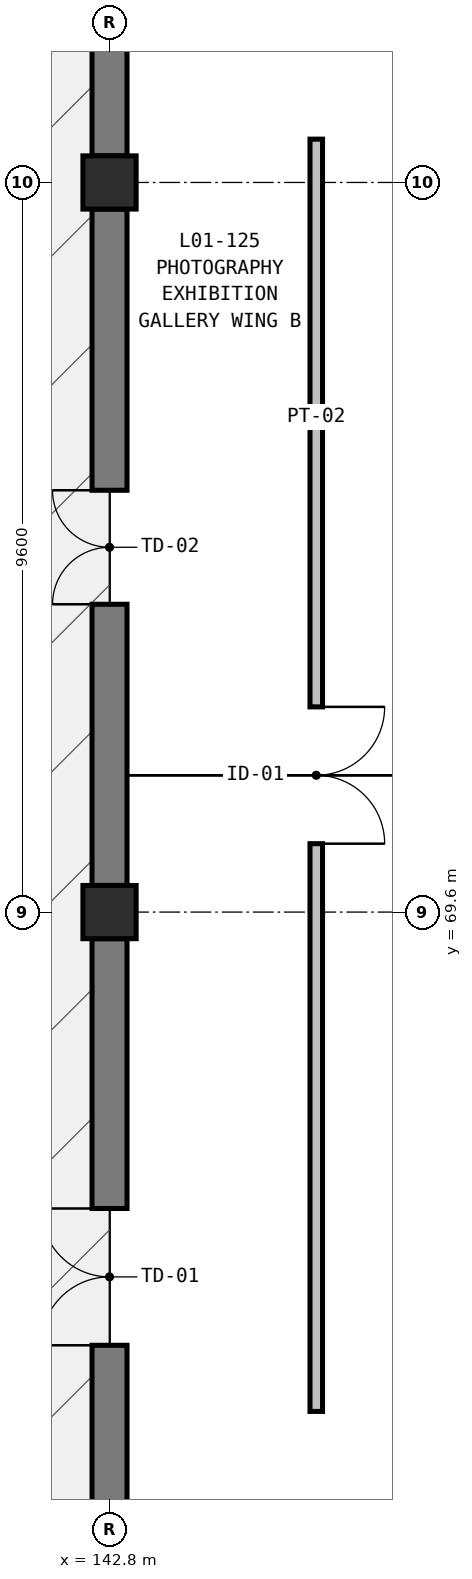
"""IFC4 building model, lengths in metres.
Left out: names, types, materials, properties, quantities, classifications, styles, units other than length and angle.
Written with IfcOpenShell. Run it as: python <this file> out.ifc"""

import sys

from ifc_helpers import new_model, si_unit, direction, frame, frame_2d, origin, origin_2d, place, context, subcontext, project, spatial, rectangle, extrude, element, fill, save


model = new_model("IFC4")
c1 = context("Model", 3, precision=1e-05, world=origin(), true_north=direction((0.0, 1.0)))
c2 = subcontext(c1, "Body", "Model", "MODEL_VIEW")
j1 = project(units=[si_unit("LENGTHUNIT", "METRE"), si_unit("PLANEANGLEUNIT", "RADIAN")], contexts=[c1])
p1 = place(None, origin())
s1 = spatial("IfcSite", under=j1, at=p1, CompositionType="ELEMENT")
p2 = place(p1, origin())
s2 = spatial("IfcBuilding", under=s1, at=p2, CompositionType="ELEMENT")
p3 = place(p2, frame((0.0, 0.0, 6.0)))
s3 = spatial("IfcBuildingStorey", under=s2, at=p3, CompositionType="ELEMENT", Elevation=6.0)
for number, where, z_axis, x_axis in (
    (1, (142.8, 69.6, 0.0), (0.0, 0.0, 1.0), (1.0, 0.0, 0.0)),
    (2, (142.8, 79.2, 0.0), (0.0, 0.0, 1.0), (1.0, 0.0, 0.0)),
):
    element("IfcColumn", number, at=place(p3, frame(where, z_axis=z_axis, x_axis=x_axis)), inside=s3, PredefinedType="COLUMN", context=c2, shape_type="SweptSolid", body=[
        extrude(rectangle(XDim=0.7, YDim=0.7, at=origin_2d()), origin(), (0.0, 0.0, 1.0), 5.4),
    ])
p4 = place(p3, frame((142.8, 60.35, 0.0), z_axis=(0.0, 0.0, 1.0), x_axis=(0.0, 1.0, 0.0)))
e3 = element("IfcWall", 3, at=p4, inside=s3, PredefinedType="SOLIDWALL", context=c2, shape_type="SweptSolid", body=[
    extrude(rectangle(XDim=8.9, YDim=0.46, at=frame_2d((4.45, 0.0))), origin(), (0.0, 0.0, 1.0), 5.08),
])
p5 = place(p4, frame((3.55, 0.0, 0.0)))
e4 = element("IfcOpeningElement", 4, at=p5, cuts=e3, PredefinedType="OPENING", context=c2, shape_type="SweptSolid", body=[
    extrude(rectangle(XDim=1.8, YDim=2.3, at=frame_2d((0.9, 1.15))), frame((0.0, 0.24, 0.0), z_axis=(0.0, -1.0, 0.0), x_axis=(1.0, 0.0, 0.0)), (0.0, 0.0, 1.0), 0.48),
])
p6 = place(p3, frame((142.8, 69.95, 0.0), z_axis=(0.0, 0.0, 1.0), x_axis=(0.0, 1.0, 0.0)))
e5 = element("IfcWall", 5, at=p6, inside=s3, PredefinedType="SOLIDWALL", context=c2, shape_type="SweptSolid", body=[
    extrude(rectangle(XDim=8.9, YDim=0.46, at=frame_2d((4.45, 0.0))), origin(), (0.0, 0.0, 1.0), 5.08),
])
p7 = place(p6, frame((3.7, 0.0, 0.0)))
e6 = element("IfcOpeningElement", 6, at=p7, cuts=e5, PredefinedType="OPENING", context=c2, shape_type="SweptSolid", body=[
    extrude(rectangle(XDim=1.5, YDim=2.25, at=frame_2d((0.75, 1.125))), frame((0.0, 0.24, 0.0), z_axis=(0.0, -1.0, 0.0), x_axis=(1.0, 0.0, 0.0)), (0.0, 0.0, 1.0), 0.48),
])
p8 = place(p3, frame((142.8, 79.55, 0.0), z_axis=(0.0, 0.0, 1.0), x_axis=(0.0, 1.0, 0.0)))
e7 = element("IfcWall", 7, at=p8, inside=s3, PredefinedType="SOLIDWALL", context=c2, shape_type="SweptSolid", body=[
    extrude(rectangle(XDim=8.9, YDim=0.46, at=frame_2d((4.45, 0.0))), origin(), (0.0, 0.0, 1.0), 5.08),
])
p9 = place(p8, frame((3.9, 0.0, 0.0)))
e8 = element("IfcOpeningElement", 8, at=p9, cuts=e7, PredefinedType="OPENING", context=c2, shape_type="SweptSolid", body=[
    extrude(rectangle(XDim=1.1, YDim=2.2, at=frame_2d((0.55, 1.1))), frame((0.0, 0.24, 0.0), z_axis=(0.0, -1.0, 0.0), x_axis=(1.0, 0.0, 0.0)), (0.0, 0.0, 1.0), 0.48),
])
p10 = place(p3, frame((145.52, 79.77, 0.0), z_axis=(0.0, 0.0, 1.0), x_axis=(0.0, -1.0, 0.0)))
e9 = element("IfcWall", 9, at=p10, inside=s3, PredefinedType="PARTITIONING", context=c2, shape_type="SweptSolid", body=[
    extrude(rectangle(XDim=16.74, YDim=0.165, at=frame_2d((8.37, 0.0))), origin(), (0.0, 0.0, 1.0), 4.405),
])
p11 = place(p10, frame((7.47, 0.0, 0.0)))
e10 = element("IfcOpeningElement", 10, at=p11, cuts=e9, PredefinedType="OPENING", context=c2, shape_type="SweptSolid", body=[
    extrude(rectangle(XDim=1.8, YDim=2.4, at=frame_2d((0.9, 1.2))), frame((0.0, 0.093, 0.0), z_axis=(0.0, -1.0, 0.0), x_axis=(1.0, 0.0, 0.0)), (0.0, 0.0, 1.0), 0.185),
])
p12 = place(p5, origin())
e11 = element("IfcDoor", 11, at=p12, inside=s3, OperationType="DOUBLE_DOOR_SINGLE_SWING", PredefinedType="DOOR", context=c2, shape_type="SweptSolid", body=[
    extrude(rectangle(XDim=1.8, YDim=2.3, at=frame_2d((0.9, 1.15))), frame((0.0, 0.025, 0.0), z_axis=(0.0, -1.0, 0.0), x_axis=(1.0, 0.0, 0.0)), (0.0, 0.0, 1.0), 0.05),
])
fill(e4, e11)
p13 = place(p7, origin())
e12 = element("IfcDoor", 12, at=p13, inside=s3, OperationType="DOUBLE_DOOR_SINGLE_SWING", PredefinedType="DOOR", context=c2, shape_type="SweptSolid", body=[
    extrude(rectangle(XDim=1.5, YDim=2.25, at=frame_2d((0.75, 1.125))), frame((0.0, 0.025, 0.0), z_axis=(0.0, -1.0, 0.0), x_axis=(1.0, 0.0, 0.0)), (0.0, 0.0, 1.0), 0.05),
])
fill(e6, e12)
p14 = place(p11, origin())
e13 = element("IfcDoor", 13, at=p14, inside=s3, OperationType="DOUBLE_DOOR_SINGLE_SWING", PredefinedType="DOOR", context=c2, shape_type="SweptSolid", body=[
    extrude(rectangle(XDim=1.8, YDim=2.4, at=frame_2d((0.9, 1.2))), frame((0.0, 0.025, 0.0), z_axis=(0.0, -1.0, 0.0), x_axis=(1.0, 0.0, 0.0)), (0.0, 0.0, 1.0), 0.05),
])
fill(e10, e13)
save(model, sys.argv[1])
